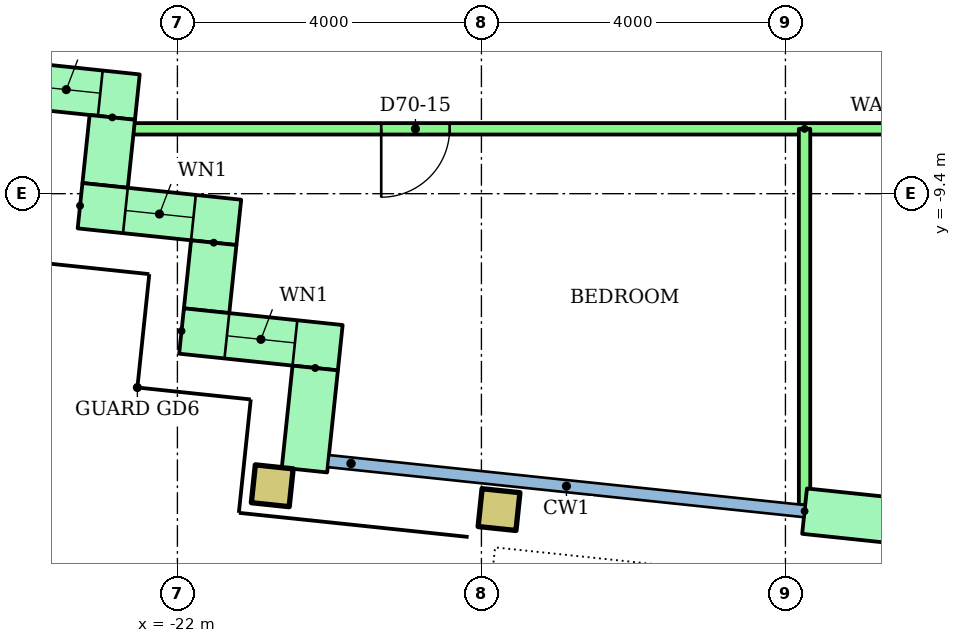
"""IFC4 building model, lengths in metres.
Left out: names, types, materials, properties, quantities, classifications, styles, units other than length and angle.
Written with IfcOpenShell. Run it as: python <this file> out.ifc"""

import sys

from ifc_helpers import new_model, si_unit, direction, frame, frame_2d, origin, origin_2d, place, context, subcontext, project, spatial, rectangle, hollow_rectangle, extrude, element, fill, save


model = new_model("IFC4")
c1 = context("Model", 3, precision=1e-05, world=origin(), true_north=direction((0.0, 1.0)))
c2 = subcontext(c1, "Body", "Model", "MODEL_VIEW")
j1 = project(units=[si_unit("LENGTHUNIT", "METRE"), si_unit("PLANEANGLEUNIT", "RADIAN")], contexts=[c1])
p1 = place(None, origin())
s1 = spatial("IfcSite", under=j1, at=p1, CompositionType="ELEMENT")
p2 = place(p1, origin())
s2 = spatial("IfcBuilding", under=s1, at=p2, CompositionType="ELEMENT")
p3 = place(p2, frame((0.0, 0.0, 269.1)))
s3 = spatial("IfcBuildingStorey", under=s2, at=p3, CompositionType="ELEMENT", Elevation=269.1)
for number, where, z_axis, x_axis in (
    (1, (-20.752, -13.243, 0.0), (0.0, 0.0, 1.0), (0.995, -0.105, 0.0)),
    (2, (-17.768, -13.556, 0.0), (0.0, 0.0, 1.0), (0.995, -0.105, 0.0)),
):
    element("IfcColumn", number, at=place(p3, frame(where, z_axis=z_axis, x_axis=x_axis)), inside=s3, PredefinedType="COLUMN", context=c2, shape_type="SweptSolid", body=[
        extrude(hollow_rectangle(XDim=0.5, YDim=0.5, WallThickness=0.025, at=origin_2d()), origin(), (0.0, 0.0, 1.0), 3.2),
    ])
p4 = place(p3, frame((-24.467, -7.925, 0.0), z_axis=(0.0, 0.0, 1.0), x_axis=(0.994521219184, -0.104534896528, 0.0)))
e3 = element("IfcWall", 3, at=p4, inside=s3, PredefinedType="STANDARD", context=c2, shape_type="SweptSolid", body=[
    extrude(rectangle(XDim=1.95, YDim=0.6, at=frame_2d((0.975, 0.0))), origin(), (0.0, 0.0, 1.0), 2.92),
])
p5 = place(p4, frame((0.56, 0.0, 0.9)))
e4 = element("IfcOpeningElement", 4, at=p5, cuts=e3, PredefinedType="OPENING", context=c2, shape_type="SweptSolid", body=[
    extrude(rectangle(XDim=0.9, YDim=1.5, at=frame_2d((0.45, 0.75))), frame((0.0, 0.31, 0.0), z_axis=(0.0, -1.0, 0.0), x_axis=(1.0, 0.0, 0.0)), (0.0, 0.0, 1.0), 0.62),
])
p6 = place(p3, frame((-22.857, -8.396, 0.0), z_axis=(0.0, 0.0, 1.0), x_axis=(-0.104444712852, -0.994530694326, 0.0)))
e5 = element("IfcWall", 5, at=p6, inside=s3, PredefinedType="STANDARD", context=c2, shape_type="SweptSolid", body=[
    extrude(rectangle(XDim=0.9, YDim=0.6, at=frame_2d((0.45, 0.0))), origin(), (0.0, 0.0, 1.0), 2.92),
])
p7 = place(p3, frame((-23.281, -9.558, 0.0), z_axis=(0.0, 0.0, 1.0), x_axis=(0.994523910136, -0.104509292252, 0.0)))
e6 = element("IfcWall", 6, at=p7, inside=s3, PredefinedType="STANDARD", context=c2, shape_type="SweptSolid", body=[
    extrude(rectangle(XDim=2.1, YDim=0.6, at=frame_2d((1.05, 0.0))), origin(), (0.0, 0.0, 1.0), 2.92),
])
p8 = place(p7, frame((0.6, 0.0, 0.9)))
e7 = element("IfcOpeningElement", 7, at=p8, cuts=e6, PredefinedType="OPENING", context=c2, shape_type="SweptSolid", body=[
    extrude(rectangle(XDim=0.9, YDim=1.5, at=frame_2d((0.45, 0.75))), frame((0.0, 0.31, 0.0), z_axis=(0.0, -1.0, 0.0), x_axis=(1.0, 0.0, 0.0)), (0.0, 0.0, 1.0), 0.62),
])
p9 = place(p3, frame((-21.522, -10.044, 0.0), z_axis=(0.0, 0.0, 1.0), x_axis=(-0.104416541099, -0.994533652495, 0.0)))
e8 = element("IfcWall", 8, at=p9, inside=s3, PredefinedType="STANDARD", context=c2, shape_type="SweptSolid", body=[
    extrude(rectangle(XDim=0.9, YDim=0.6, at=frame_2d((0.45, 0.0))), origin(), (0.0, 0.0, 1.0), 2.92),
])
p10 = place(p3, frame((-21.946, -11.207, 0.0), z_axis=(0.0, 0.0, 1.0), x_axis=(0.994511820899, -0.104624271047, 0.0)))
e9 = element("IfcWall", 9, at=p10, inside=s3, PredefinedType="STANDARD", context=c2, shape_type="SweptSolid", body=[
    extrude(rectangle(XDim=2.1, YDim=0.6, at=frame_2d((1.05, 0.0))), origin(), (0.0, 0.0, 1.0), 2.92),
])
p11 = place(p10, frame((0.6, 0.0, 0.9)))
e10 = element("IfcOpeningElement", 10, at=p11, cuts=e9, PredefinedType="OPENING", context=c2, shape_type="SweptSolid", body=[
    extrude(rectangle(XDim=0.9, YDim=1.5, at=frame_2d((0.45, 0.75))), frame((0.0, 0.31, 0.0), z_axis=(0.0, -1.0, 0.0), x_axis=(1.0, 0.0, 0.0)), (0.0, 0.0, 1.0), 0.62),
])
p12 = place(p3, frame((-20.187, -11.693, 0.0), z_axis=(0.0, 0.0, 1.0), x_axis=(-0.1043365026, -0.994542052517, 0.0)))
e11 = element("IfcWall", 11, at=p12, inside=s3, PredefinedType="STANDARD", context=c2, shape_type="SweptSolid", body=[
    extrude(rectangle(XDim=1.35, YDim=0.6, at=frame_2d((0.675, 0.0))), origin(), (0.0, 0.0, 1.0), 2.92),
])
p13 = place(p3, frame((-13.749, -13.576, 0.0), z_axis=(0.0, 0.0, 1.0), x_axis=(0.994519156568, -0.104554517933, 0.0)))
e12 = element("IfcWall", 12, at=p13, inside=s3, PredefinedType="STANDARD", context=c2, shape_type="SweptSolid", body=[
    extrude(rectangle(XDim=4.0, YDim=0.6, at=frame_2d((2.0, 0.0))), origin(), (0.0, 0.0, 1.0), 2.92),
])
p14 = place(p13, frame((1.4, 0.0, 0.0)))
e13 = element("IfcOpeningElement", 13, at=p14, cuts=e12, PredefinedType="OPENING", context=c2, shape_type="SweptSolid", body=[
    extrude(rectangle(XDim=1.2, YDim=2.1, at=frame_2d((0.6, 1.05))), frame((0.0, 0.31, 0.0), z_axis=(0.0, -1.0, 0.0), x_axis=(1.0, 0.0, 0.0)), (0.0, 0.0, 1.0), 0.62),
])
p15 = place(p3, frame((-1.814, -8.547, 0.0), z_axis=(0.0, 0.0, 1.0), x_axis=(-1.0, 0.0, 0.0)))
e14 = element("IfcWall", 14, at=p15, inside=s3, PredefinedType="PARTITIONING", context=c2, shape_type="SweptSolid", body=[
    extrude(rectangle(XDim=20.767, YDim=0.15, at=frame_2d((10.384, 0.0))), origin(), (0.0, 0.0, 1.0), 2.4),
])
p16 = place(p15, frame((16.604, 0.0, 0.0)))
e15 = element("IfcOpeningElement", 15, at=p16, cuts=e14, PredefinedType="OPENING", context=c2, shape_type="SweptSolid", body=[
    extrude(rectangle(XDim=0.9, YDim=2.1, at=frame_2d((0.45, 1.05))), frame((0.0, 0.085, 0.0), z_axis=(0.0, -1.0, 0.0), x_axis=(1.0, 0.0, 0.0)), (0.0, 0.0, 1.0), 0.17),
])
p17 = place(p15, frame((9.446, 0.0, 0.0)))
e16 = element("IfcOpeningElement", 16, at=p17, cuts=e14, PredefinedType="OPENING", context=c2, shape_type="SweptSolid", body=[
    extrude(rectangle(XDim=1.0, YDim=2.1, at=frame_2d((0.5, 1.05))), frame((0.0, 0.085, 0.0), z_axis=(0.0, -1.0, 0.0), x_axis=(1.0, 0.0, 0.0)), (0.0, 0.0, 1.0), 0.17),
])
p18 = place(p15, frame((5.517, 0.0, 0.0)))
e17 = element("IfcOpeningElement", 17, at=p18, cuts=e14, PredefinedType="OPENING", context=c2, shape_type="SweptSolid", body=[
    extrude(rectangle(XDim=0.9, YDim=2.1, at=frame_2d((0.45, 1.05))), frame((0.0, 0.085, 0.0), z_axis=(0.0, -1.0, 0.0), x_axis=(1.0, 0.0, 0.0)), (0.0, 0.0, 1.0), 0.17),
])
p19 = place(p15, frame((1.539, 0.0, 0.0)))
e18 = element("IfcOpeningElement", 18, at=p19, cuts=e14, PredefinedType="OPENING", context=c2, shape_type="SweptSolid", body=[
    extrude(rectangle(XDim=0.9, YDim=2.1, at=frame_2d((0.45, 1.05))), frame((0.0, 0.085, 0.0), z_axis=(0.0, -1.0, 0.0), x_axis=(1.0, 0.0, 0.0)), (0.0, 0.0, 1.0), 0.17),
])
p20 = place(p3, frame((-13.749, -8.547, 0.0), z_axis=(0.0, 0.0, 1.0), x_axis=(0.0, -1.0, 0.0)))
e19 = element("IfcWall", 19, at=p20, inside=s3, PredefinedType="PARTITIONING", context=c2, shape_type="SweptSolid", body=[
    extrude(rectangle(XDim=4.95, YDim=0.15, at=frame_2d((2.475, 0.0))), origin(), (0.0, 0.0, 1.0), 2.4),
])
p21 = place(p5, origin())
e20 = element("IfcWindow", 20, at=p21, inside=s3, PartitioningType="SINGLE_PANEL", PredefinedType="WINDOW", context=c2, shape_type="SweptSolid", body=[
    extrude(rectangle(XDim=0.9, YDim=1.5, at=frame_2d((0.45, 0.75))), frame((0.0, 0.03, 0.0), z_axis=(0.0, -1.0, 0.0), x_axis=(1.0, 0.0, 0.0)), (0.0, 0.0, 1.0), 0.06),
])
fill(e4, e20)
p22 = place(p8, origin())
e21 = element("IfcWindow", 21, at=p22, inside=s3, PartitioningType="SINGLE_PANEL", PredefinedType="WINDOW", context=c2, shape_type="SweptSolid", body=[
    extrude(rectangle(XDim=0.9, YDim=1.5, at=frame_2d((0.45, 0.75))), frame((0.0, 0.03, 0.0), z_axis=(0.0, -1.0, 0.0), x_axis=(1.0, 0.0, 0.0)), (0.0, 0.0, 1.0), 0.06),
])
fill(e7, e21)
p23 = place(p11, origin())
e22 = element("IfcWindow", 22, at=p23, inside=s3, PartitioningType="SINGLE_PANEL", PredefinedType="WINDOW", context=c2, shape_type="SweptSolid", body=[
    extrude(rectangle(XDim=0.9, YDim=1.5, at=frame_2d((0.45, 0.75))), frame((0.0, 0.03, 0.0), z_axis=(0.0, -1.0, 0.0), x_axis=(1.0, 0.0, 0.0)), (0.0, 0.0, 1.0), 0.06),
])
fill(e10, e22)
p24 = place(p16, origin())
e23 = element("IfcDoor", 23, at=p24, inside=s3, OperationType="SINGLE_SWING_RIGHT", PredefinedType="DOOR", context=c2, shape_type="SweptSolid", body=[
    extrude(rectangle(XDim=0.9, YDim=2.1, at=frame_2d((0.45, 1.05))), frame((0.0, 0.025, 0.0), z_axis=(0.0, -1.0, 0.0), x_axis=(1.0, 0.0, 0.0)), (0.0, 0.0, 1.0), 0.05),
])
fill(e15, e23)
save(model, sys.argv[1])
